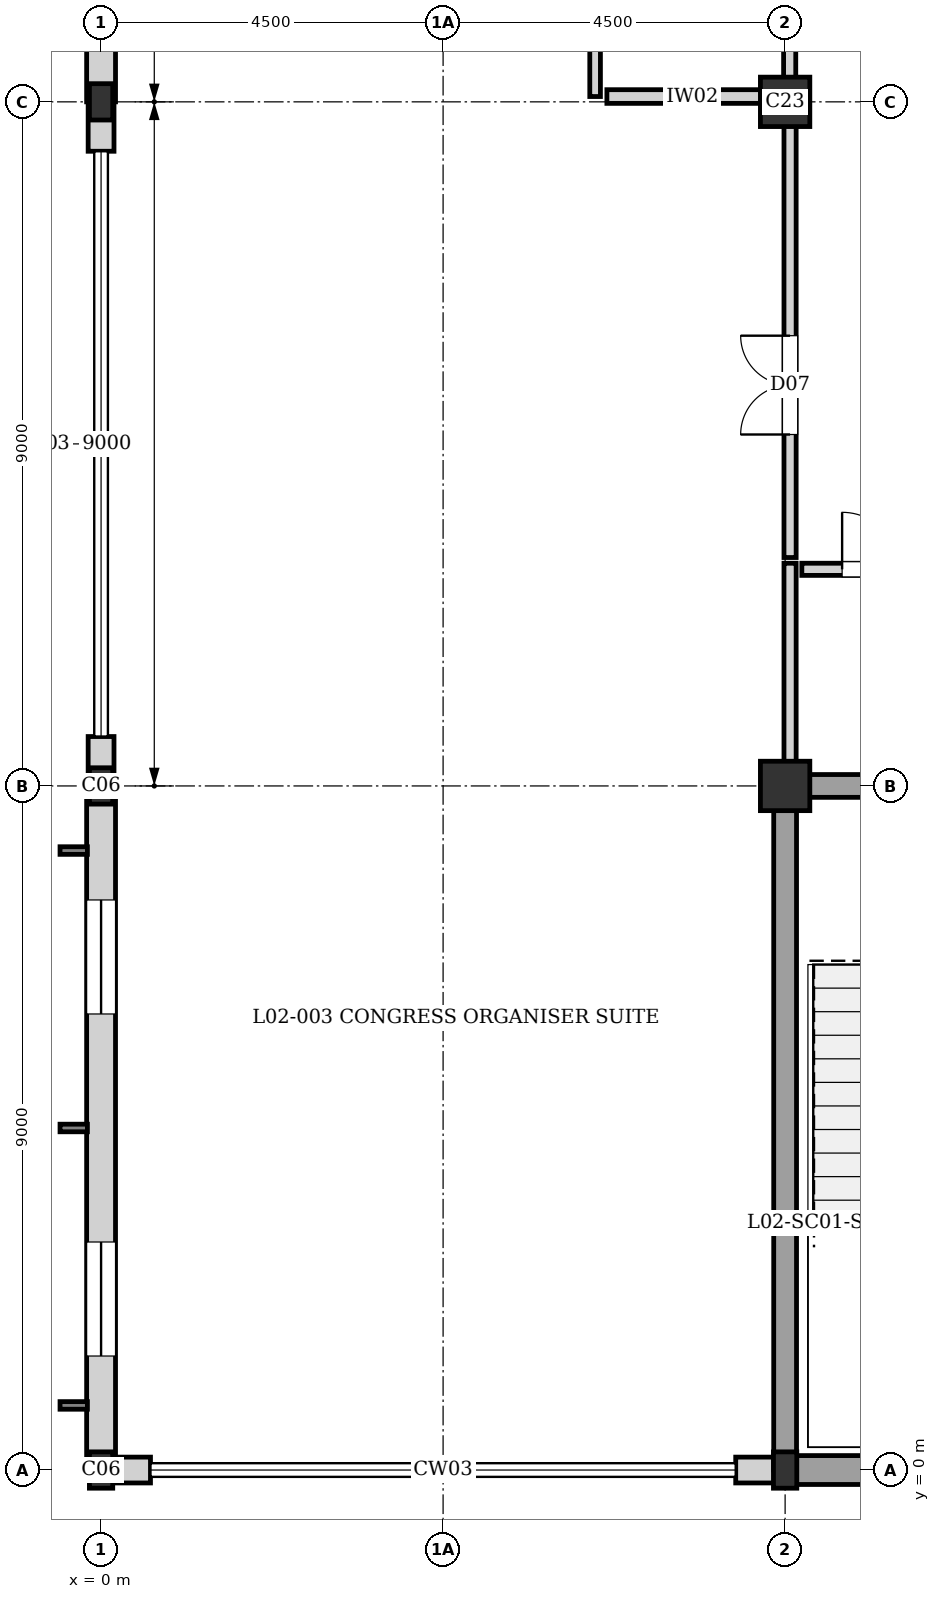
"""IFC4 building model, lengths in metres.
Left out: names, types, materials, properties, quantities, classifications, styles, units other than length and angle.
Written with IfcOpenShell. Run it as: python <this file> out.ifc"""

import sys

from ifc_helpers import new_model, si_unit, direction, frame, frame_2d, origin, origin_2d, place, context, subcontext, project, spatial, rectangle, i_section, extrude, element, fill, save


model = new_model("IFC4")
c1 = context("Model", 3, precision=1e-05, world=origin(), true_north=direction((0.0, 1.0)))
c2 = subcontext(c1, "Body", "Model", "MODEL_VIEW")
j1 = project(units=[si_unit("LENGTHUNIT", "METRE"), si_unit("PLANEANGLEUNIT", "RADIAN")], contexts=[c1])
p1 = place(None, origin())
s1 = spatial("IfcSite", under=j1, at=p1, CompositionType="ELEMENT")
p2 = place(p1, origin())
s2 = spatial("IfcBuilding", under=s1, at=p2, CompositionType="ELEMENT")
p3 = place(p2, frame((0.0, 0.0, 8.16)))
s3 = spatial("IfcBuildingStorey", under=s2, at=p3, CompositionType="ELEMENT", Elevation=8.16)
for number, where, z_axis, x_axis in (
    (1, (0.0, 0.0, 0.0), (0.0, 0.0, 1.0), (1.0, 0.0, 0.0)),
    (2, (0.0, 9.0, 0.0), (0.0, 0.0, 1.0), (1.0, 0.0, 0.0)),
    (3, (0.0, 18.0, 0.0), (0.0, 0.0, 1.0), (1.0, 0.0, 0.0)),
    (4, (9.0, 0.0, 0.0), (0.0, 0.0, 1.0), (1.0, 0.0, 0.0)),
):
    element("IfcColumn", number, at=place(p3, frame(where, z_axis=z_axis, x_axis=x_axis)), inside=s3, PredefinedType="COLUMN", context=c2, shape_type="SweptSolid", body=[
        extrude(i_section(OverallWidth=0.307, OverallDepth=0.478, WebThickness=0.021, FlangeThickness=0.04, at=origin_2d()), origin(), (0.0, 0.0, 1.0), 3.36),
    ])
for number, where, z_axis, x_axis in (
    (5, (9.0, 9.0, 0.0), (0.0, 0.0, 1.0), (1.0, 0.0, 0.0)),
    (6, (9.0, 18.0, 0.0), (0.0, 0.0, 1.0), (1.0, 0.0, 0.0)),
):
    element("IfcColumn", number, at=place(p3, frame(where, z_axis=z_axis, x_axis=x_axis)), inside=s3, PredefinedType="COLUMN", context=c2, shape_type="SweptSolid", body=[
        extrude(rectangle(XDim=0.65, YDim=0.65, at=origin_2d()), origin(), (0.0, 0.0, 1.0), 3.36),
    ])
p4 = place(p3, frame((18.0, 0.0, 0.0), z_axis=(0.0, 0.0, 1.0), x_axis=(-1.0, 0.0, 0.0)))
e7 = element("IfcWall", 7, at=p4, inside=s3, PredefinedType="SOLIDWALL", context=c2, shape_type="SweptSolid", body=[
    extrude(rectangle(XDim=9.0, YDim=0.38, at=frame_2d((4.5, 0.0))), origin(), (0.0, 0.0, 1.0), 3.14),
])
p5 = place(p3, frame((8.87, 0.0, 0.0), z_axis=(0.0, 0.0, 1.0), x_axis=(-1.0, 0.0, 0.0)))
e8 = element("IfcWall", 8, at=p5, inside=s3, PredefinedType="SOLIDWALL", context=c2, shape_type="SweptSolid", body=[
    extrude(rectangle(XDim=0.52, YDim=0.34, at=frame_2d((0.26, 0.0))), origin(), (0.0, 0.0, 1.0), 2.87),
])
p6 = place(p3, frame((0.65, 0.0, 0.0), z_axis=(0.0, 0.0, 1.0), x_axis=(-1.0, 0.0, 0.0)))
e9 = element("IfcWall", 9, at=p6, inside=s3, PredefinedType="SOLIDWALL", context=c2, shape_type="SweptSolid", body=[
    extrude(rectangle(XDim=0.65, YDim=0.34, at=frame_2d((0.325, 0.0))), origin(), (0.0, 0.0, 1.0), 2.87),
])
p7 = place(p3, frame((0.0, 0.155, 0.0), z_axis=(0.0, 0.0, 1.0), x_axis=(0.0, 1.0, 0.0)))
e10 = element("IfcWall", 10, at=p7, inside=s3, PredefinedType="SOLIDWALL", context=c2, shape_type="SweptSolid", body=[
    extrude(rectangle(XDim=8.845, YDim=0.38, at=frame_2d((4.422, 0.0))), origin(), (0.0, 0.0, 1.0), 2.8),
])
p8 = place(p7, frame((1.345, 0.0, 0.35)))
e11 = element("IfcOpeningElement", 11, at=p8, cuts=e10, PredefinedType="OPENING", context=c2, shape_type="SweptSolid", body=[
    extrude(rectangle(XDim=1.5, YDim=1.8, at=frame_2d((0.75, 0.9))), frame((0.0, 0.2, 0.0), z_axis=(0.0, -1.0, 0.0), x_axis=(1.0, 0.0, 0.0)), (0.0, 0.0, 1.0), 0.4),
])
p9 = place(p7, frame((5.845, 0.0, 0.35)))
e12 = element("IfcOpeningElement", 12, at=p9, cuts=e10, PredefinedType="OPENING", context=c2, shape_type="SweptSolid", body=[
    extrude(rectangle(XDim=1.5, YDim=1.8, at=frame_2d((0.75, 0.9))), frame((0.0, 0.2, 0.0), z_axis=(0.0, -1.0, 0.0), x_axis=(1.0, 0.0, 0.0)), (0.0, 0.0, 1.0), 0.4),
])
for number, where, z_axis, x_axis in (
    (13, (0.0, 9.0, 0.0), (0.0, 0.0, 1.0), (0.0, 1.0, 0.0)),
    (14, (0.0, 17.35, 0.0), (0.0, 0.0, 1.0), (0.0, 1.0, 0.0)),
):
    element("IfcWall", number, at=place(p3, frame(where, z_axis=z_axis, x_axis=x_axis)), inside=s3, PredefinedType="SOLIDWALL", context=c2, shape_type="SweptSolid", body=[
        extrude(rectangle(XDim=0.65, YDim=0.34, at=frame_2d((0.325, 0.0))), origin(), (0.0, 0.0, 1.0), 2.74),
    ])
p10 = place(p3, frame((0.0, 18.0, 0.0), z_axis=(0.0, 0.0, 1.0), x_axis=(0.0, 1.0, 0.0)))
e15 = element("IfcWall", 15, at=p10, inside=s3, PredefinedType="SOLIDWALL", context=c2, shape_type="SweptSolid", body=[
    extrude(rectangle(XDim=9.0, YDim=0.38, at=frame_2d((4.5, 0.0))), origin(), (0.0, 0.0, 1.0), 2.7),
])
p11 = place(p10, frame((1.5, 0.0, 0.35)))
e16 = element("IfcOpeningElement", 16, at=p11, cuts=e15, PredefinedType="OPENING", context=c2, shape_type="SweptSolid", body=[
    extrude(rectangle(XDim=1.5, YDim=1.8, at=frame_2d((0.75, 0.9))), frame((0.0, 0.2, 0.0), z_axis=(0.0, -1.0, 0.0), x_axis=(1.0, 0.0, 0.0)), (0.0, 0.0, 1.0), 0.4),
])
p12 = place(p10, frame((6.0, 0.0, 0.35)))
e17 = element("IfcOpeningElement", 17, at=p12, cuts=e15, PredefinedType="OPENING", context=c2, shape_type="SweptSolid", body=[
    extrude(rectangle(XDim=1.5, YDim=1.8, at=frame_2d((0.75, 0.9))), frame((0.0, 0.2, 0.0), z_axis=(0.0, -1.0, 0.0), x_axis=(1.0, 0.0, 0.0)), (0.0, 0.0, 1.0), 0.4),
])
p13 = place(p3, frame((9.0, 9.0, 0.0), z_axis=(0.0, 0.0, 1.0), x_axis=(1.0, 0.0, 0.0)))
e18 = element("IfcWall", 18, at=p13, inside=s3, PredefinedType="SHEAR", context=c2, shape_type="SweptSolid", body=[
    extrude(rectangle(XDim=9.0, YDim=0.3, at=frame_2d((4.5, 0.0))), origin(), (0.0, 0.0, 1.0), 3.14),
])
p14 = place(p13, frame((5.95, 0.0, 0.0)))
e19 = element("IfcOpeningElement", 19, at=p14, cuts=e18, PredefinedType="OPENING", context=c2, shape_type="SweptSolid", body=[
    extrude(rectangle(XDim=1.6, YDim=2.1, at=frame_2d((0.8, 1.05))), frame((0.0, 0.16, 0.0), z_axis=(0.0, -1.0, 0.0), x_axis=(1.0, 0.0, 0.0)), (0.0, 0.0, 1.0), 0.32),
])
p15 = place(p3, frame((9.0, 0.0, 0.0), z_axis=(0.0, 0.0, 1.0), x_axis=(0.0, 1.0, 0.0)))
e20 = element("IfcWall", 20, at=p15, inside=s3, PredefinedType="SHEAR", context=c2, shape_type="SweptSolid", body=[
    extrude(rectangle(XDim=9.0, YDim=0.3, at=frame_2d((4.5, 0.0))), origin(), (0.0, 0.0, 1.0), 3.14),
])
p16 = place(p3, frame((9.06, 18.07, 0.0), z_axis=(0.0, 0.0, 1.0), x_axis=(0.0, 1.0, 0.0)))
e21 = element("IfcWall", 21, at=p16, inside=s3, PredefinedType="PARTITIONING", context=c2, shape_type="SweptSolid", body=[
    extrude(rectangle(XDim=2.06, YDim=0.16, at=frame_2d((1.03, 0.0))), origin(), (0.0, 0.0, 1.0), 2.81),
])
p17 = place(p3, frame((6.5, 18.07, 0.0), z_axis=(0.0, 0.0, 1.0), x_axis=(0.0, 1.0, 0.0)))
e22 = element("IfcWall", 22, at=p17, inside=s3, PredefinedType="PLUMBINGWALL", context=c2, shape_type="SweptSolid", body=[
    extrude(rectangle(XDim=2.06, YDim=0.14, at=frame_2d((1.03, 0.0))), origin(), (0.0, 0.0, 1.0), 3.14),
])
p18 = place(p3, frame((6.655, 18.07, 0.0), z_axis=(0.0, 0.0, 1.0), x_axis=(1.0, 0.0, 0.0)))
e23 = element("IfcWall", 23, at=p18, inside=s3, PredefinedType="PARTITIONING", context=c2, shape_type="SweptSolid", body=[
    extrude(rectangle(XDim=2.25, YDim=0.18, at=frame_2d((1.125, 0.0))), origin(), (0.0, 0.0, 1.0), 2.87),
])
p19 = place(p3, frame((9.065, 9.155, 0.0), z_axis=(0.0, 0.0, 1.0), x_axis=(0.0, 1.0, 0.0)))
e24 = element("IfcWall", 24, at=p19, inside=s3, PredefinedType="PARTITIONING", context=c2, shape_type="SweptSolid", body=[
    extrude(rectangle(XDim=2.775, YDim=0.16, at=frame_2d((1.387, 0.0))), origin(), (0.0, 0.0, 1.0), 2.41),
])
p20 = place(p3, frame((9.22, 11.85, 0.0), z_axis=(0.0, 0.0, 1.0), x_axis=(1.0, 0.0, 0.0)))
e25 = element("IfcWall", 25, at=p20, inside=s3, PredefinedType="PARTITIONING", context=c2, shape_type="SweptSolid", body=[
    extrude(rectangle(XDim=2.56, YDim=0.16, at=frame_2d((1.28, 0.0))), origin(), (0.0, 0.0, 1.0), 3.14),
])
p21 = place(p20, frame((0.53, 0.0, 0.0)))
e26 = element("IfcOpeningElement", 26, at=p21, cuts=e25, PredefinedType="OPENING", context=c2, shape_type="SweptSolid", body=[
    extrude(rectangle(XDim=1.5, YDim=2.1, at=frame_2d((0.75, 1.05))), frame((0.0, 0.09, 0.0), z_axis=(0.0, -1.0, 0.0), x_axis=(1.0, 0.0, 0.0)), (0.0, 0.0, 1.0), 0.18),
])
p22 = place(p3, frame((9.065, 12.005, 0.0), z_axis=(0.0, 0.0, 1.0), x_axis=(0.0, 1.0, 0.0)))
e27 = element("IfcWall", 27, at=p22, inside=s3, PredefinedType="PARTITIONING", context=c2, shape_type="SweptSolid", body=[
    extrude(rectangle(XDim=5.97, YDim=0.16, at=frame_2d((2.985, 0.0))), origin(), (0.0, 0.0, 1.0), 2.41),
])
p23 = place(p22, frame((1.619, 0.0, 0.0)))
e28 = element("IfcOpeningElement", 28, at=p23, cuts=e27, PredefinedType="OPENING", context=c2, shape_type="SweptSolid", body=[
    extrude(rectangle(XDim=1.3, YDim=2.25, at=frame_2d((0.65, 1.125))), frame((0.0, 0.09, 0.0), z_axis=(0.0, -1.0, 0.0), x_axis=(1.0, 0.0, 0.0)), (0.0, 0.0, 1.0), 0.18),
])
p24 = place(p8, origin())
e29 = element("IfcWindow", 29, at=p24, inside=s3, PartitioningType="SINGLE_PANEL", PredefinedType="WINDOW", context=c2, shape_type="SweptSolid", body=[
    extrude(rectangle(XDim=1.5, YDim=1.8, at=frame_2d((0.75, 0.9))), frame((0.0, 0.03, 0.0), z_axis=(0.0, -1.0, 0.0), x_axis=(1.0, 0.0, 0.0)), (0.0, 0.0, 1.0), 0.06),
])
fill(e11, e29)
p25 = place(p9, origin())
e30 = element("IfcWindow", 30, at=p25, inside=s3, PartitioningType="SINGLE_PANEL", PredefinedType="WINDOW", context=c2, shape_type="SweptSolid", body=[
    extrude(rectangle(XDim=1.5, YDim=1.8, at=frame_2d((0.75, 0.9))), frame((0.0, 0.03, 0.0), z_axis=(0.0, -1.0, 0.0), x_axis=(1.0, 0.0, 0.0)), (0.0, 0.0, 1.0), 0.06),
])
fill(e12, e30)
p26 = place(p21, origin())
e31 = element("IfcDoor", 31, at=p26, inside=s3, OperationType="DOUBLE_DOOR_SINGLE_SWING", PredefinedType="DOOR", context=c2, shape_type="SweptSolid", body=[
    extrude(rectangle(XDim=1.5, YDim=2.1, at=frame_2d((0.75, 1.05))), frame((0.0, 0.025, 0.0), z_axis=(0.0, -1.0, 0.0), x_axis=(1.0, 0.0, 0.0)), (0.0, 0.0, 1.0), 0.05),
])
fill(e26, e31)
p27 = place(p23, origin())
e32 = element("IfcDoor", 32, at=p27, inside=s3, OperationType="DOUBLE_DOOR_SINGLE_SWING", PredefinedType="DOOR", context=c2, shape_type="SweptSolid", body=[
    extrude(rectangle(XDim=1.3, YDim=2.25, at=frame_2d((0.65, 1.125))), frame((0.0, 0.025, 0.0), z_axis=(0.0, -1.0, 0.0), x_axis=(1.0, 0.0, 0.0)), (0.0, 0.0, 1.0), 0.05),
])
fill(e28, e32)
save(model, sys.argv[1])
